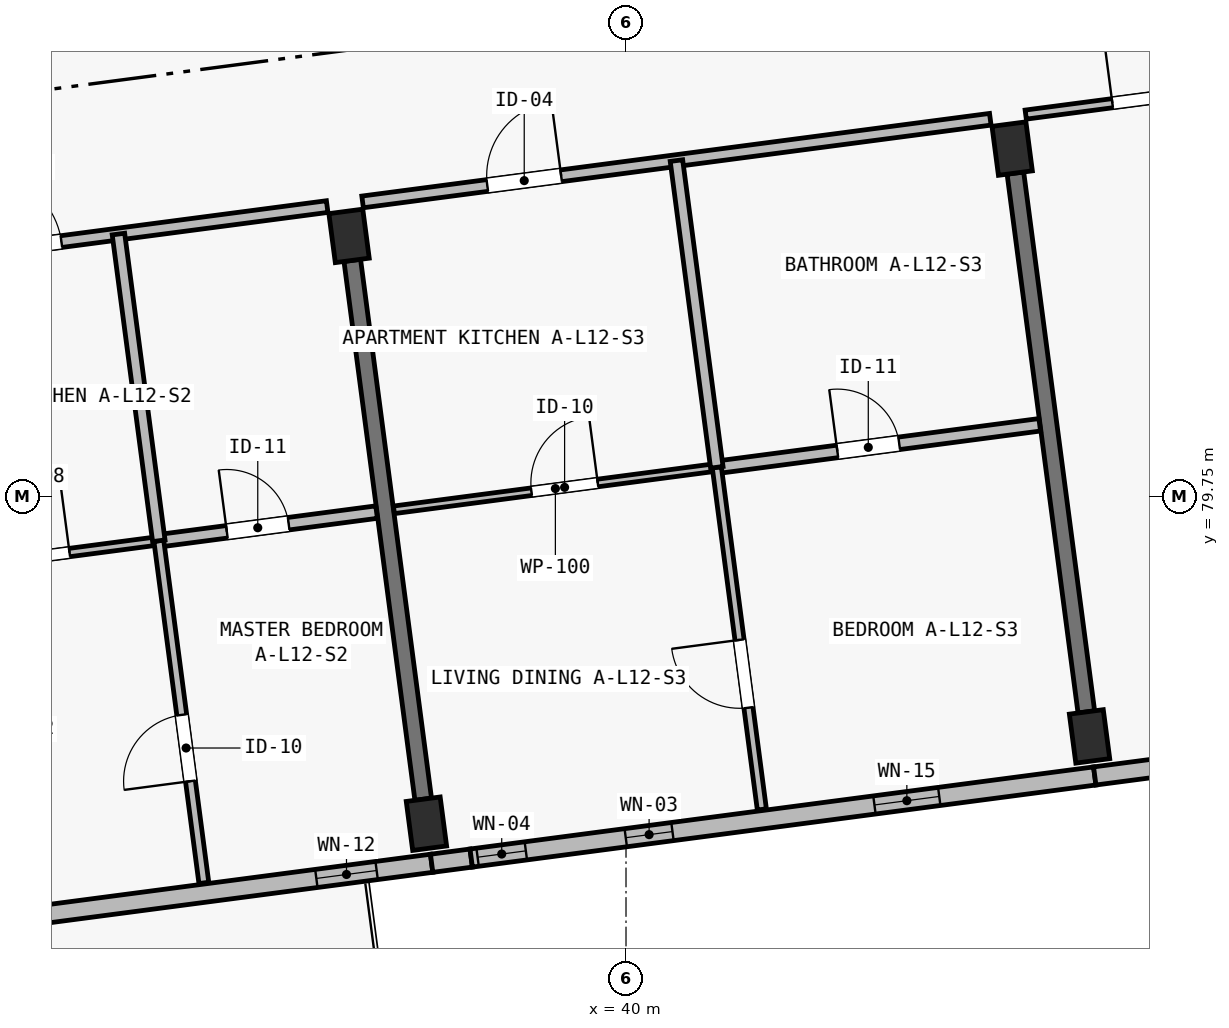
"""IFC4 building model, lengths in metres.
Left out: names, types, materials, properties, quantities, classifications, styles, units other than length and angle.
Written with IfcOpenShell. Run it as: python <this file> out.ifc"""

import sys

from ifc_helpers import new_model, si_unit, direction, frame, frame_2d, origin, origin_2d, place, context, subcontext, project, spatial, polyline, rectangle, outline, extrude, element, fill, save


model = new_model("IFC4")
c1 = context("Model", 3, precision=1e-05, world=origin(), true_north=direction((0.0, 1.0)))
c2 = subcontext(c1, "Body", "Model", "MODEL_VIEW")
j1 = project(units=[si_unit("LENGTHUNIT", "METRE"), si_unit("PLANEANGLEUNIT", "RADIAN")], contexts=[c1])
p1 = place(None, origin())
s1 = spatial("IfcSite", under=j1, at=p1, CompositionType="ELEMENT")
p2 = place(p1, origin())
s2 = spatial("IfcBuilding", under=s1, at=p2, CompositionType="ELEMENT")
p3 = place(p2, frame((0.0, 0.0, 40.9)))
s3 = spatial("IfcBuildingStorey", under=s2, at=p3, CompositionType="ELEMENT", Elevation=40.9)
for number, where, z_axis, x_axis in (
    (1, (37.374, 75.446, 0.0), (0.0, 0.0, 1.0), (0.991, 0.131, 0.0)),
    (2, (36.356, 83.179, 0.0), (0.0, 0.0, 1.0), (0.991, 0.131, 0.0)),
    (3, (46.099, 76.594, 0.0), (0.0, 0.0, 1.0), (0.991, 0.131, 0.0)),
    (4, (45.081, 84.328, 0.0), (0.0, 0.0, 1.0), (0.991, 0.131, 0.0)),
):
    element("IfcColumn", number, at=place(p3, frame(where, z_axis=z_axis, x_axis=x_axis)), inside=s3, PredefinedType="COLUMN", context=c2, shape_type="SweptSolid", body=[
        extrude(rectangle(XDim=0.45, YDim=0.65, at=origin_2d()), origin(), (0.0, 0.0, 1.0), 3.25),
    ])
p4 = place(p3, frame((37.332, 75.768, 0.0), z_axis=(0.0, 0.0, 1.0), x_axis=(-0.130537539388, 0.991443367425, 0.0)))
e5 = element("IfcWall", 5, at=p4, inside=s3, PredefinedType="SHEAR", context=c2, shape_type="SweptSolid", body=[
    extrude(rectangle(XDim=7.15, YDim=0.22, at=frame_2d((3.575, 0.0))), origin(), (0.0, 0.0, 1.0), 2.5),
])
p5 = place(p3, frame((46.056, 76.917, 0.0), z_axis=(0.0, 0.0, 1.0), x_axis=(-0.130503975686, 0.991447785983, 0.0)))
e6 = element("IfcWall", 6, at=p5, inside=s3, PredefinedType="SHEAR", context=c2, shape_type="SweptSolid", body=[
    extrude(rectangle(XDim=7.15, YDim=0.22, at=frame_2d((3.575, 0.0))), origin(), (0.0, 0.0, 1.0), 2.5),
])
p6 = place(p3, frame((37.443, 74.925, 0.0), z_axis=(0.0, 0.0, 1.0), x_axis=(-0.991447495205, -0.130506184728, 0.0)))
e7 = element("IfcWall", 7, at=p6, inside=s3, PredefinedType="SOLIDWALL", context=c2, shape_type="SweptSolid", body=[
    extrude(rectangle(XDim=8.8, YDim=0.24, at=frame_2d((4.4, 0.0))), origin(), (0.0, 0.0, 1.0), 3.0),
])
p7 = place(p6, frame((5.997, 0.0, 0.0)))
e8 = element("IfcOpeningElement", 8, at=p7, cuts=e7, PredefinedType="OPENING", context=c2, shape_type="SweptSolid", body=[
    extrude(rectangle(XDim=1.8, YDim=2.12, at=frame_2d((0.9, 1.06))), frame((0.0, 0.135, 0.0), z_axis=(0.0, -1.0, 0.0), x_axis=(1.0, 0.0, 0.0)), (0.0, 0.0, 1.0), 0.27),
])
p8 = place(p6, frame((0.73, 0.0, 0.5)))
e9 = element("IfcOpeningElement", 9, at=p8, cuts=e7, PredefinedType="OPENING", context=c2, shape_type="SweptSolid", body=[
    extrude(rectangle(XDim=0.8, YDim=2.3, at=frame_2d((0.4, 1.15))), frame((0.0, 0.135, 0.0), z_axis=(0.0, -1.0, 0.0), x_axis=(1.0, 0.0, 0.0)), (0.0, 0.0, 1.0), 0.27),
])
p9 = place(p3, frame((37.963, 74.994, 0.0), z_axis=(0.0, 0.0, 1.0), x_axis=(-0.991425781816, -0.130671034095, 0.0)))
e10 = element("IfcWall", 10, at=p9, inside=s3, PredefinedType="SOLIDWALL", context=c2, shape_type="SweptSolid", body=[
    extrude(rectangle(XDim=0.525, YDim=0.24, at=frame_2d((0.262, 0.0))), origin(), (0.0, 0.0, 1.0), 3.0),
])
p10 = place(p3, frame((46.167, 76.074, 0.0), z_axis=(0.0, 0.0, 1.0), x_axis=(-0.991445556921, -0.130520908907, 0.0)))
e11 = element("IfcWall", 11, at=p10, inside=s3, PredefinedType="SOLIDWALL", context=c2, shape_type="SweptSolid", body=[
    extrude(outline(polyline([(0.0, 0.0), (8.275, 0.0), (8.275, 6.301), (0.0, 4.901), (0.0, 0.0)])), frame((0.0, 0.12, 0.0), z_axis=(0.0, -1.0, 0.0), x_axis=(1.0, 0.0, 0.0)), (0.0, 0.0, 1.0), 0.24),
])
p11 = place(p10, frame((2.064, 0.0, 0.42)))
e12 = element("IfcOpeningElement", 12, at=p11, cuts=e11, PredefinedType="OPENING", context=c2, shape_type="SweptSolid", body=[
    extrude(rectangle(XDim=0.86, YDim=2.36, at=frame_2d((0.43, 1.18))), frame((0.0, 0.135, 0.0), z_axis=(0.0, -1.0, 0.0), x_axis=(1.0, 0.0, 0.0)), (0.0, 0.0, 1.0), 0.27),
])
p12 = place(p10, frame((5.604, 0.0, 0.42)))
e13 = element("IfcOpeningElement", 13, at=p12, cuts=e11, PredefinedType="OPENING", context=c2, shape_type="SweptSolid", body=[
    extrude(rectangle(XDim=0.62, YDim=2.28, at=frame_2d((0.31, 1.14))), frame((0.0, 0.135, 0.0), z_axis=(0.0, -1.0, 0.0), x_axis=(1.0, 0.0, 0.0)), (0.0, 0.0, 1.0), 0.27),
])
p13 = place(p10, frame((7.55, 0.0, 0.48)))
e14 = element("IfcOpeningElement", 14, at=p13, cuts=e11, PredefinedType="OPENING", context=c2, shape_type="SweptSolid", body=[
    extrude(rectangle(XDim=0.64, YDim=2.18, at=frame_2d((0.32, 1.09))), frame((0.0, 0.135, 0.0), z_axis=(0.0, -1.0, 0.0), x_axis=(1.0, 0.0, 0.0)), (0.0, 0.0, 1.0), 0.27),
])
p14 = place(p3, frame((55.413, 77.291, 0.0), z_axis=(0.0, 0.0, 1.0), x_axis=(-0.991442885224, -0.130541201693, 0.0)))
e15 = element("IfcWall", 15, at=p14, inside=s3, PredefinedType="SOLIDWALL", context=c2, shape_type="SweptSolid", body=[
    extrude(outline(polyline([(0.0, 0.0), (9.325, 0.0), (9.325, 4.901), (0.0, 3.323), (0.0, 0.0)])), frame((0.0, 0.12, 0.0), z_axis=(0.0, -1.0, 0.0), x_axis=(1.0, 0.0, 0.0)), (0.0, 0.0, 1.0), 0.24),
])
p15 = place(p14, frame((1.244, 0.0, 0.48)))
e16 = element("IfcOpeningElement", 16, at=p15, cuts=e15, PredefinedType="OPENING", context=c2, shape_type="SweptSolid", body=[
    extrude(rectangle(XDim=0.66, YDim=2.32, at=frame_2d((0.33, 1.16))), frame((0.0, 0.135, 0.0), z_axis=(0.0, -1.0, 0.0), x_axis=(1.0, 0.0, 0.0)), (0.0, 0.0, 1.0), 0.27),
])
p16 = place(p14, frame((5.573, 0.0, 0.48)))
e17 = element("IfcOpeningElement", 17, at=p16, cuts=e15, PredefinedType="OPENING", context=c2, shape_type="SweptSolid", body=[
    extrude(rectangle(XDim=0.72, YDim=2.16, at=frame_2d((0.36, 1.08))), frame((0.0, 0.135, 0.0), z_axis=(0.0, -1.0, 0.0), x_axis=(1.0, 0.0, 0.0)), (0.0, 0.0, 1.0), 0.27),
])
p17 = place(p3, frame((30.809, 82.873, 0.0), z_axis=(0.0, 0.0, 1.0), x_axis=(0.991445991454, 0.130517608122, 0.0)))
e18 = element("IfcWall", 18, at=p17, inside=s3, PredefinedType="PARTITIONING", context=c2, shape_type="SweptSolid", body=[
    extrude(rectangle(XDim=5.305, YDim=0.155, at=frame_2d((2.652, 0.0))), origin(), (0.0, 0.0, 1.0), 2.97),
])
p18 = place(p17, frame((0.758, 0.0, 0.0)))
e19 = element("IfcOpeningElement", 19, at=p18, cuts=e18, PredefinedType="OPENING", context=c2, shape_type="SweptSolid", body=[
    extrude(rectangle(XDim=1.02, YDim=2.2, at=frame_2d((0.51, 1.1))), frame((0.0, 0.093, 0.0), z_axis=(0.0, -1.0, 0.0), x_axis=(1.0, 0.0, 0.0)), (0.0, 0.0, 1.0), 0.185),
])
p19 = place(p3, frame((28.222, 78.427, 0.0), z_axis=(0.0, 0.0, 1.0), x_axis=(0.991443905556, 0.130533452169, 0.0)))
e20 = element("IfcWall", 20, at=p19, inside=s3, PredefinedType="PARTITIONING", context=c2, shape_type="SweptSolid", body=[
    extrude(rectangle(XDim=5.68, YDim=0.11, at=frame_2d((2.84, 0.0))), origin(), (0.0, 0.0, 1.0), 2.97),
])
p20 = place(p19, frame((3.595, 0.0, 0.0)))
e21 = element("IfcOpeningElement", 21, at=p20, cuts=e20, PredefinedType="OPENING", context=c2, shape_type="SweptSolid", body=[
    extrude(rectangle(XDim=0.9, YDim=2.1, at=frame_2d((0.45, 1.05))), frame((0.0, 0.07, 0.0), z_axis=(0.0, -1.0, 0.0), x_axis=(1.0, 0.0, 0.0)), (0.0, 0.0, 1.0), 0.14),
])
p21 = place(p3, frame((33.853, 79.168, 0.0), z_axis=(0.0, 0.0, 1.0), x_axis=(0.9914456672, 0.130520071219, 0.0)))
e22 = element("IfcWall", 22, at=p21, inside=s3, PredefinedType="PLUMBINGWALL", context=c2, shape_type="SweptSolid", body=[
    extrude(rectangle(XDim=2.89, YDim=0.165, at=frame_2d((1.445, 0.0))), origin(), (0.0, 0.0, 1.0), 2.97),
])
p22 = place(p21, frame((0.903, 0.0, 0.0)))
e23 = element("IfcOpeningElement", 23, at=p22, cuts=e22, PredefinedType="OPENING", context=c2, shape_type="SweptSolid", body=[
    extrude(rectangle(XDim=0.82, YDim=2.08, at=frame_2d((0.41, 1.04))), frame((0.0, 0.097, 0.0), z_axis=(0.0, -1.0, 0.0), x_axis=(1.0, 0.0, 0.0)), (0.0, 0.0, 1.0), 0.195),
])
p23 = place(p3, frame((34.446, 74.667, 0.0), z_axis=(0.0, 0.0, 1.0), x_axis=(-0.130511545171, 0.991446789584, 0.0)))
e24 = element("IfcWall", 24, at=p23, inside=s3, PredefinedType="PARTITIONING", context=c2, shape_type="SweptSolid", body=[
    extrude(rectangle(XDim=4.54, YDim=0.13, at=frame_2d((2.27, 0.0))), origin(), (0.0, 0.0, 1.0), 2.97),
])
p24 = place(p23, frame((1.35, 0.0, 0.0)))
e25 = element("IfcOpeningElement", 25, at=p24, cuts=e24, PredefinedType="OPENING", context=c2, shape_type="SweptSolid", body=[
    extrude(rectangle(XDim=0.88, YDim=2.1, at=frame_2d((0.44, 1.05))), frame((0.0, 0.08, 0.0), z_axis=(0.0, -1.0, 0.0), x_axis=(1.0, 0.0, 0.0)), (0.0, 0.0, 1.0), 0.16),
])
p25 = place(p3, frame((33.853, 79.168, 0.0), z_axis=(0.0, 0.0, 1.0), x_axis=(-0.13052899417, 0.991444492486, 0.0)))
e26 = element("IfcWall", 26, at=p25, inside=s3, PredefinedType="PLUMBINGWALL", context=c2, shape_type="SweptSolid", body=[
    extrude(rectangle(XDim=4.07, YDim=0.165, at=frame_2d((2.035, 0.0))), origin(), (0.0, 0.0, 1.0), 2.97),
])
p26 = place(p3, frame((36.534, 83.626, 0.0), z_axis=(0.0, 0.0, 1.0), x_axis=(0.991443119217, 0.13053942453, 0.0)))
e27 = element("IfcWall", 27, at=p26, inside=s3, PredefinedType="PARTITIONING", context=c2, shape_type="SweptSolid", body=[
    extrude(rectangle(XDim=8.33, YDim=0.155, at=frame_2d((4.165, 0.0))), origin(), (0.0, 0.0, 1.0), 2.97),
])
p27 = place(p26, frame((1.655, 0.0, 0.0)))
e28 = element("IfcOpeningElement", 28, at=p27, cuts=e27, PredefinedType="OPENING", context=c2, shape_type="SweptSolid", body=[
    extrude(rectangle(XDim=0.98, YDim=2.15, at=frame_2d((0.49, 1.075))), frame((0.0, 0.093, 0.0), z_axis=(0.0, -1.0, 0.0), x_axis=(1.0, 0.0, 0.0)), (0.0, 0.0, 1.0), 0.185),
])
p28 = place(p3, frame((36.947, 79.575, 0.0), z_axis=(0.0, 0.0, 1.0), x_axis=(0.991444014242, 0.130532626667, 0.0)))
e29 = element("IfcWall", 29, at=p28, inside=s3, PredefinedType="PARTITIONING", context=c2, shape_type="SweptSolid", body=[
    extrude(rectangle(XDim=4.285, YDim=0.1, at=frame_2d((2.143, 0.0))), origin(), (0.0, 0.0, 1.0), 2.97),
])
p29 = place(p28, frame((1.825, 0.0, 0.0)))
e30 = element("IfcOpeningElement", 30, at=p29, cuts=e29, PredefinedType="OPENING", context=c2, shape_type="SweptSolid", body=[
    extrude(rectangle(XDim=0.88, YDim=2.1, at=frame_2d((0.44, 1.05))), frame((0.0, 0.065, 0.0), z_axis=(0.0, -1.0, 0.0), x_axis=(1.0, 0.0, 0.0)), (0.0, 0.0, 1.0), 0.13),
])
p30 = place(p3, frame((41.195, 80.135, 0.0), z_axis=(0.0, 0.0, 1.0), x_axis=(0.991444014242, 0.130532626667, 0.0)))
e31 = element("IfcWall", 31, at=p30, inside=s3, PredefinedType="PLUMBINGWALL", context=c2, shape_type="SweptSolid", body=[
    extrude(rectangle(XDim=4.285, YDim=0.165, at=frame_2d((2.143, 0.0))), origin(), (0.0, 0.0, 1.0), 2.97),
])
p31 = place(p30, frame((1.6, 0.0, 0.0)))
e32 = element("IfcOpeningElement", 32, at=p31, cuts=e31, PredefinedType="OPENING", context=c2, shape_type="SweptSolid", body=[
    extrude(rectangle(XDim=0.82, YDim=2.08, at=frame_2d((0.41, 1.04))), frame((0.0, 0.097, 0.0), z_axis=(0.0, -1.0, 0.0), x_axis=(1.0, 0.0, 0.0)), (0.0, 0.0, 1.0), 0.195),
])
p32 = place(p3, frame((41.787, 75.634, 0.0), z_axis=(0.0, 0.0, 1.0), x_axis=(-0.130511545171, 0.991446789584, 0.0)))
e33 = element("IfcWall", 33, at=p32, inside=s3, PredefinedType="PARTITIONING", context=c2, shape_type="SweptSolid", body=[
    extrude(rectangle(XDim=4.54, YDim=0.12, at=frame_2d((2.27, 0.0))), origin(), (0.0, 0.0, 1.0), 2.97),
])
p33 = place(p32, frame((1.35, 0.0, 0.0)))
e34 = element("IfcOpeningElement", 34, at=p33, cuts=e33, PredefinedType="OPENING", context=c2, shape_type="SweptSolid", body=[
    extrude(rectangle(XDim=0.9, YDim=2.1, at=frame_2d((0.45, 1.05))), frame((0.0, 0.075, 0.0), z_axis=(0.0, -1.0, 0.0), x_axis=(1.0, 0.0, 0.0)), (0.0, 0.0, 1.0), 0.15),
])
p34 = place(p3, frame((41.195, 80.135, 0.0), z_axis=(0.0, 0.0, 1.0), x_axis=(-0.13052899417, 0.991444492486, 0.0)))
e35 = element("IfcWall", 35, at=p34, inside=s3, PredefinedType="PLUMBINGWALL", context=c2, shape_type="SweptSolid", body=[
    extrude(rectangle(XDim=4.07, YDim=0.165, at=frame_2d((2.035, 0.0))), origin(), (0.0, 0.0, 1.0), 2.97),
])
p35 = place(p3, frame((45.259, 84.775, 0.0), z_axis=(0.0, 0.0, 1.0), x_axis=(0.991446103591, 0.130516756293, 0.0)))
e36 = element("IfcWall", 36, at=p35, inside=s3, PredefinedType="PARTITIONING", context=c2, shape_type="SweptSolid", body=[
    extrude(rectangle(XDim=5.885, YDim=0.12, at=frame_2d((2.942, 0.0))), origin(), (0.0, 0.0, 1.0), 3.15),
])
p36 = place(p35, frame((1.15, 0.0, 0.0)))
e37 = element("IfcOpeningElement", 37, at=p36, cuts=e36, PredefinedType="OPENING", context=c2, shape_type="SweptSolid", body=[
    extrude(rectangle(XDim=1.15, YDim=2.15, at=frame_2d((0.575, 1.075))), frame((0.0, 0.075, 0.0), z_axis=(0.0, -1.0, 0.0), x_axis=(1.0, 0.0, 0.0)), (0.0, 0.0, 1.0), 0.15),
])
p37 = place(p8, origin())
e38 = element("IfcWindow", 38, at=p37, inside=s3, PartitioningType="SINGLE_PANEL", PredefinedType="WINDOW", context=c2, shape_type="SweptSolid", body=[
    extrude(rectangle(XDim=0.8, YDim=2.3, at=frame_2d((0.4, 1.15))), frame((0.0, 0.03, 0.0), z_axis=(0.0, -1.0, 0.0), x_axis=(1.0, 0.0, 0.0)), (0.0, 0.0, 1.0), 0.06),
])
fill(e9, e38)
p38 = place(p11, origin())
e39 = element("IfcWindow", 39, at=p38, inside=s3, PartitioningType="SINGLE_PANEL", PredefinedType="WINDOW", context=c2, shape_type="SweptSolid", body=[
    extrude(rectangle(XDim=0.86, YDim=2.36, at=frame_2d((0.43, 1.18))), frame((0.0, 0.03, 0.0), z_axis=(0.0, -1.0, 0.0), x_axis=(1.0, 0.0, 0.0)), (0.0, 0.0, 1.0), 0.06),
])
fill(e12, e39)
p39 = place(p12, origin())
e40 = element("IfcWindow", 40, at=p39, inside=s3, PartitioningType="SINGLE_PANEL", PredefinedType="WINDOW", context=c2, shape_type="SweptSolid", body=[
    extrude(rectangle(XDim=0.62, YDim=2.28, at=frame_2d((0.31, 1.14))), frame((0.0, 0.03, 0.0), z_axis=(0.0, -1.0, 0.0), x_axis=(1.0, 0.0, 0.0)), (0.0, 0.0, 1.0), 0.06),
])
fill(e13, e40)
p40 = place(p13, origin())
e41 = element("IfcWindow", 41, at=p40, inside=s3, PartitioningType="SINGLE_PANEL", PredefinedType="WINDOW", context=c2, shape_type="SweptSolid", body=[
    extrude(rectangle(XDim=0.64, YDim=2.18, at=frame_2d((0.32, 1.09))), frame((0.0, 0.03, 0.0), z_axis=(0.0, -1.0, 0.0), x_axis=(1.0, 0.0, 0.0)), (0.0, 0.0, 1.0), 0.06),
])
fill(e14, e41)
p41 = place(p18, origin())
e42 = element("IfcDoor", 42, at=p41, inside=s3, OperationType="SINGLE_SWING_LEFT", PredefinedType="DOOR", context=c2, shape_type="SweptSolid", body=[
    extrude(rectangle(XDim=1.02, YDim=2.2, at=frame_2d((0.51, 1.1))), frame((0.0, 0.025, 0.0), z_axis=(0.0, -1.0, 0.0), x_axis=(1.0, 0.0, 0.0)), (0.0, 0.0, 1.0), 0.05),
])
fill(e19, e42)
p42 = place(p20, origin())
e43 = element("IfcDoor", 43, at=p42, inside=s3, OperationType="SINGLE_SWING_RIGHT", PredefinedType="DOOR", context=c2, shape_type="SweptSolid", body=[
    extrude(rectangle(XDim=0.9, YDim=2.1, at=frame_2d((0.45, 1.05))), frame((0.0, 0.025, 0.0), z_axis=(0.0, -1.0, 0.0), x_axis=(1.0, 0.0, 0.0)), (0.0, 0.0, 1.0), 0.05),
])
fill(e21, e43)
p43 = place(p22, origin())
e44 = element("IfcDoor", 44, at=p43, inside=s3, OperationType="SINGLE_SWING_LEFT", PredefinedType="DOOR", context=c2, shape_type="SweptSolid", body=[
    extrude(rectangle(XDim=0.82, YDim=2.08, at=frame_2d((0.41, 1.04))), frame((0.0, 0.025, 0.0), z_axis=(0.0, -1.0, 0.0), x_axis=(1.0, 0.0, 0.0)), (0.0, 0.0, 1.0), 0.05),
])
fill(e23, e44)
p44 = place(p24, origin())
e45 = element("IfcDoor", 45, at=p44, inside=s3, OperationType="SINGLE_SWING_LEFT", PredefinedType="DOOR", context=c2, shape_type="SweptSolid", body=[
    extrude(rectangle(XDim=0.88, YDim=2.1, at=frame_2d((0.44, 1.05))), frame((0.0, 0.025, 0.0), z_axis=(0.0, -1.0, 0.0), x_axis=(1.0, 0.0, 0.0)), (0.0, 0.0, 1.0), 0.05),
])
fill(e25, e45)
p45 = place(p27, origin())
e46 = element("IfcDoor", 46, at=p45, inside=s3, OperationType="SINGLE_SWING_RIGHT", PredefinedType="DOOR", context=c2, shape_type="SweptSolid", body=[
    extrude(rectangle(XDim=0.98, YDim=2.15, at=frame_2d((0.49, 1.075))), frame((0.0, 0.025, 0.0), z_axis=(0.0, -1.0, 0.0), x_axis=(1.0, 0.0, 0.0)), (0.0, 0.0, 1.0), 0.05),
])
fill(e28, e46)
p46 = place(p29, origin())
e47 = element("IfcDoor", 47, at=p46, inside=s3, OperationType="SINGLE_SWING_RIGHT", PredefinedType="DOOR", context=c2, shape_type="SweptSolid", body=[
    extrude(rectangle(XDim=0.88, YDim=2.1, at=frame_2d((0.44, 1.05))), frame((0.0, 0.025, 0.0), z_axis=(0.0, -1.0, 0.0), x_axis=(1.0, 0.0, 0.0)), (0.0, 0.0, 1.0), 0.05),
])
fill(e30, e47)
p47 = place(p31, origin())
e48 = element("IfcDoor", 48, at=p47, inside=s3, OperationType="SINGLE_SWING_LEFT", PredefinedType="DOOR", context=c2, shape_type="SweptSolid", body=[
    extrude(rectangle(XDim=0.82, YDim=2.08, at=frame_2d((0.41, 1.04))), frame((0.0, 0.025, 0.0), z_axis=(0.0, -1.0, 0.0), x_axis=(1.0, 0.0, 0.0)), (0.0, 0.0, 1.0), 0.05),
])
fill(e32, e48)
p48 = place(p33, origin())
e49 = element("IfcDoor", 49, at=p48, inside=s3, OperationType="SINGLE_SWING_RIGHT", PredefinedType="DOOR", context=c2, shape_type="SweptSolid", body=[
    extrude(rectangle(XDim=0.9, YDim=2.1, at=frame_2d((0.45, 1.05))), frame((0.0, 0.025, 0.0), z_axis=(0.0, -1.0, 0.0), x_axis=(1.0, 0.0, 0.0)), (0.0, 0.0, 1.0), 0.05),
])
fill(e34, e49)
p49 = place(p36, origin())
e50 = element("IfcDoor", 50, at=p49, inside=s3, OperationType="SINGLE_SWING_LEFT", PredefinedType="DOOR", context=c2, shape_type="SweptSolid", body=[
    extrude(rectangle(XDim=1.15, YDim=2.15, at=frame_2d((0.575, 1.075))), frame((0.0, 0.025, 0.0), z_axis=(0.0, -1.0, 0.0), x_axis=(1.0, 0.0, 0.0)), (0.0, 0.0, 1.0), 0.05),
])
fill(e37, e50)
save(model, sys.argv[1])
